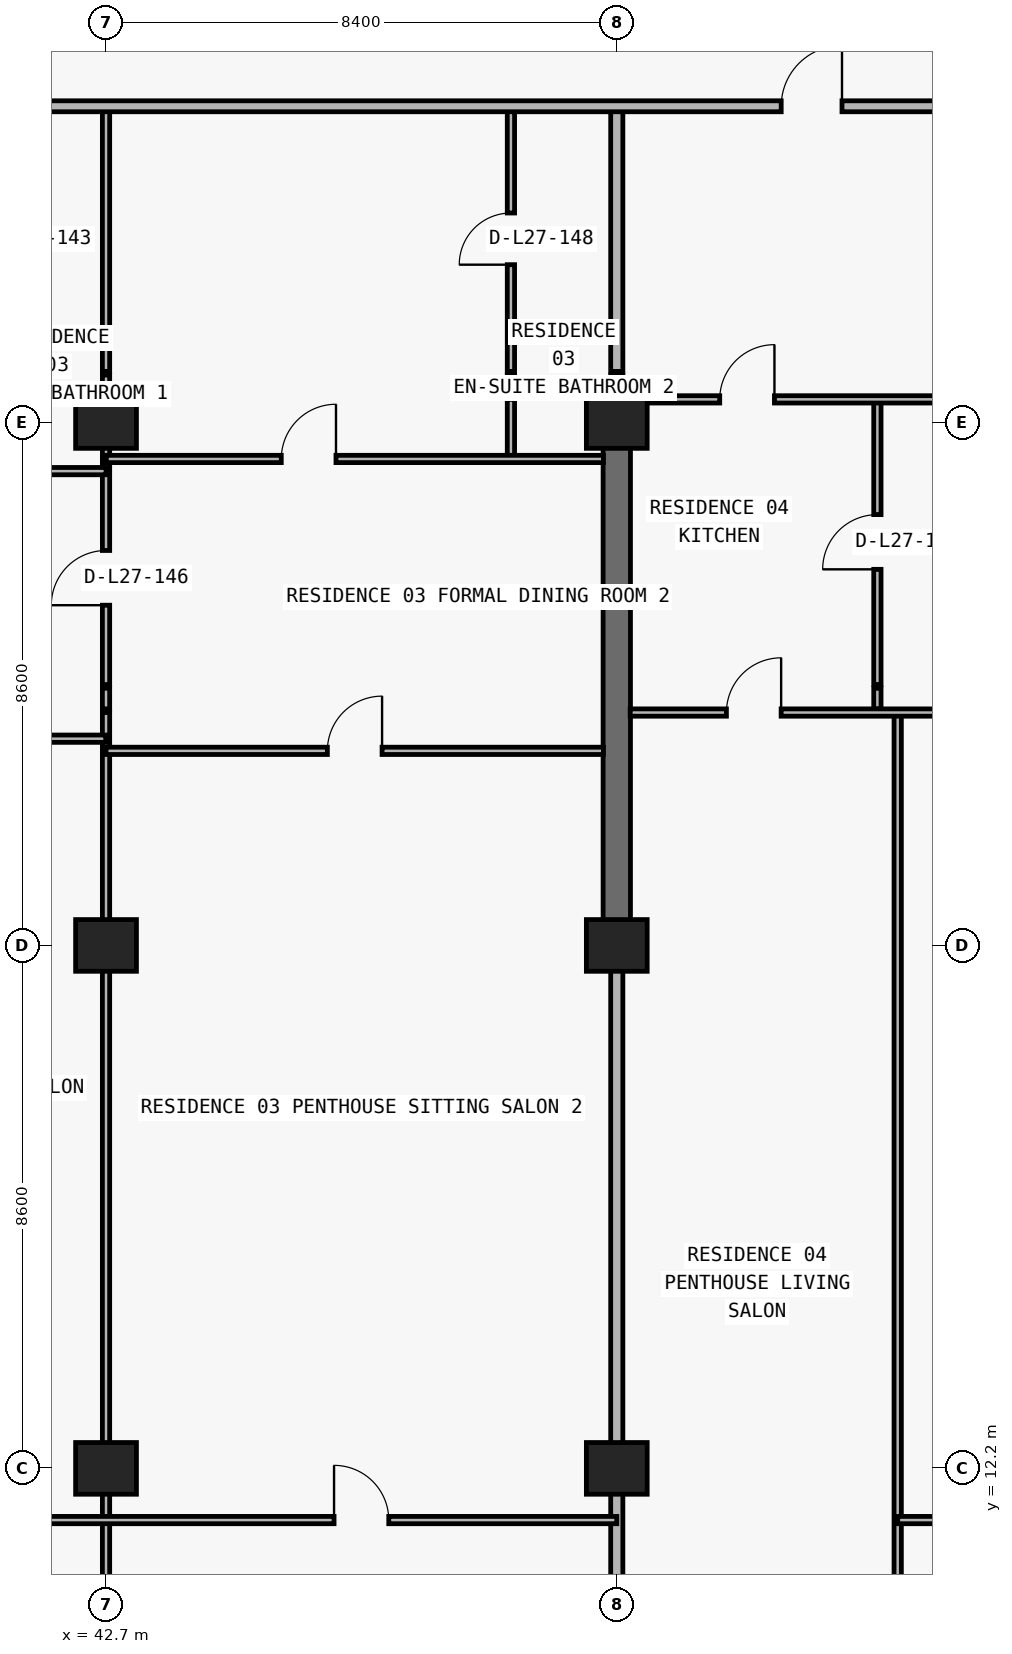
"""IFC4 building model, lengths in metres.
Left out: names, types, materials, properties, quantities, classifications, styles, units other than length and angle.
Written with IfcOpenShell. Run it as: python <this file> out.ifc"""

import sys

from ifc_helpers import new_model, si_unit, direction, frame, frame_2d, origin, origin_2d, place, context, subcontext, project, spatial, rectangle, extrude, element, fill, save


model = new_model("IFC4")
c1 = context("Model", 3, precision=1e-05, world=origin(), true_north=direction((0.0, 1.0)))
c2 = subcontext(c1, "Body", "Model", "MODEL_VIEW")
j1 = project(units=[si_unit("LENGTHUNIT", "METRE"), si_unit("PLANEANGLEUNIT", "RADIAN")], contexts=[c1])
p1 = place(None, origin())
s1 = spatial("IfcSite", under=j1, at=p1, CompositionType="ELEMENT")
p2 = place(p1, origin())
s2 = spatial("IfcBuilding", under=s1, at=p2, CompositionType="ELEMENT")
p3 = place(p2, frame((0.0, 0.0, 102.6)))
s3 = spatial("IfcBuildingStorey", under=s2, at=p3, CompositionType="ELEMENT", Elevation=102.6)
for number, where, z_axis, x_axis in (
    (1, (42.7, 12.2, 0.0), (0.0, 0.0, 1.0), (1.0, 0.0, 0.0)),
    (2, (51.1, 12.2, 0.0), (0.0, 0.0, 1.0), (1.0, 0.0, 0.0)),
    (3, (42.7, 20.8, 0.0), (0.0, 0.0, 1.0), (1.0, 0.0, 0.0)),
    (4, (51.1, 20.8, 0.0), (0.0, 0.0, 1.0), (1.0, 0.0, 0.0)),
    (5, (42.7, 29.4, 0.0), (0.0, 0.0, 1.0), (1.0, 0.0, 0.0)),
    (6, (51.1, 29.4, 0.0), (0.0, 0.0, 1.0), (1.0, 0.0, 0.0)),
):
    element("IfcColumn", number, at=place(p3, frame(where, z_axis=z_axis, x_axis=x_axis)), inside=s3, PredefinedType="COLUMN", context=c2, shape_type="SweptSolid", body=[
        extrude(rectangle(XDim=1.0, YDim=0.85, at=origin_2d()), origin(), (0.0, 0.0, 1.0), 3.05),
    ])
p4 = place(p3, frame((51.1, 20.8, 0.0), z_axis=(0.0, 0.0, 1.0), x_axis=(0.0, 1.0, 0.0)))
e7 = element("IfcWall", 7, at=p4, inside=s3, PredefinedType="SHEAR", context=c2, shape_type="SweptSolid", body=[
    extrude(rectangle(XDim=8.6, YDim=0.45, at=frame_2d((4.3, 0.0))), origin(), (0.0, 0.0, 1.0), 3.05),
])
p5 = place(p3, frame((42.7, 8.84, 0.0), z_axis=(0.0, 0.0, 1.0), x_axis=(0.0, 1.0, 0.0)))
e8 = element("IfcWall", 8, at=p5, inside=s3, PredefinedType="PARTITIONING", context=c2, shape_type="SweptSolid", body=[
    extrude(rectangle(XDim=15.79, YDim=0.12, at=frame_2d((7.895, 0.0))), origin(), (0.0, 0.0, 1.0), 2.174),
])
p6 = place(p3, frame((42.7, 24.69, 0.0), z_axis=(0.0, 0.0, 1.0), x_axis=(0.0, 1.0, 0.0)))
e9 = element("IfcWall", 9, at=p6, inside=s3, PredefinedType="PARTITIONING", context=c2, shape_type="SweptSolid", body=[
    extrude(rectangle(XDim=0.34, YDim=0.12, at=frame_2d((0.17, 0.0))), origin(), (0.0, 0.0, 1.0), 2.174),
])
p7 = place(p3, frame((42.7, 25.09, 0.0), z_axis=(0.0, 0.0, 1.0), x_axis=(0.0, 1.0, 0.0)))
e10 = element("IfcWall", 10, at=p7, inside=s3, PredefinedType="PARTITIONING", context=c2, shape_type="SweptSolid", body=[
    extrude(rectangle(XDim=4.69, YDim=0.12, at=frame_2d((2.345, 0.0))), origin(), (0.0, 0.0, 1.0), 2.174),
])
p8 = place(p7, frame((1.305, 0.0, 0.0)))
e11 = element("IfcOpeningElement", 11, at=p8, cuts=e10, PredefinedType="OPENING", context=c2, shape_type="SweptSolid", body=[
    extrude(rectangle(XDim=0.9, YDim=2.124, at=frame_2d((0.45, 1.062))), frame((0.0, 0.07, 0.0), z_axis=(0.0, -1.0, 0.0), x_axis=(1.0, 0.0, 0.0)), (0.0, 0.0, 1.0), 0.14),
])
p9 = place(p3, frame((42.7, 29.84, 0.0), z_axis=(0.0, 0.0, 1.0), x_axis=(0.0, 1.0, 0.0)))
e12 = element("IfcWall", 12, at=p9, inside=s3, PredefinedType="PARTITIONING", context=c2, shape_type="SweptSolid", body=[
    extrude(rectangle(XDim=0.34, YDim=0.12, at=frame_2d((0.17, 0.0))), origin(), (0.0, 0.0, 1.0), 2.174),
])
p10 = place(p3, frame((42.7, 30.24, 0.0), z_axis=(0.0, 0.0, 1.0), x_axis=(0.0, 1.0, 0.0)))
e13 = element("IfcWall", 13, at=p10, inside=s3, PredefinedType="PARTITIONING", context=c2, shape_type="SweptSolid", body=[
    extrude(rectangle(XDim=4.36, YDim=0.12, at=frame_2d((2.18, 0.0))), origin(), (0.0, 0.0, 1.0), 2.174),
])
p11 = place(p3, frame((49.359, 28.8, 0.0), z_axis=(0.0, 0.0, 1.0), x_axis=(0.0, 1.0, 0.0)))
e14 = element("IfcWall", 14, at=p11, inside=s3, PredefinedType="PARTITIONING", context=c2, shape_type="SweptSolid", body=[
    extrude(rectangle(XDim=0.98, YDim=0.12, at=frame_2d((0.49, 0.0))), origin(), (0.0, 0.0, 1.0), 3.05),
])
p12 = place(p3, frame((49.359, 29.84, 0.0), z_axis=(0.0, 0.0, 1.0), x_axis=(0.0, 1.0, 0.0)))
e15 = element("IfcWall", 15, at=p12, inside=s3, PredefinedType="PARTITIONING", context=c2, shape_type="SweptSolid", body=[
    extrude(rectangle(XDim=0.34, YDim=0.12, at=frame_2d((0.17, 0.0))), origin(), (0.0, 0.0, 1.0), 3.05),
])
p13 = place(p3, frame((49.359, 30.24, 0.0), z_axis=(0.0, 0.0, 1.0), x_axis=(0.0, 1.0, 0.0)))
e16 = element("IfcWall", 16, at=p13, inside=s3, PredefinedType="PARTITIONING", context=c2, shape_type="SweptSolid", body=[
    extrude(rectangle(XDim=4.36, YDim=0.12, at=frame_2d((2.18, 0.0))), origin(), (0.0, 0.0, 1.0), 3.05),
])
p14 = place(p13, frame((1.755, 0.0, 0.0)))
e17 = element("IfcOpeningElement", 17, at=p14, cuts=e16, PredefinedType="OPENING", context=c2, shape_type="SweptSolid", body=[
    extrude(rectangle(XDim=0.85, YDim=2.1, at=frame_2d((0.425, 1.05))), frame((0.0, 0.07, 0.0), z_axis=(0.0, -1.0, 0.0), x_axis=(1.0, 0.0, 0.0)), (0.0, 0.0, 1.0), 0.14),
])
p15 = place(p3, frame((51.1, 8.84, 0.0), z_axis=(0.0, 0.0, 1.0), x_axis=(0.0, 1.0, 0.0)))
e18 = element("IfcWall", 18, at=p15, inside=s3, PredefinedType="PARTITIONING", context=c2, shape_type="SweptSolid", body=[
    extrude(rectangle(XDim=11.955, YDim=0.2, at=frame_2d((5.978, 0.0))), origin(), (0.0, 0.0, 1.0), 2.174),
])
p16 = place(p3, frame((51.1, 29.405, 0.0), z_axis=(0.0, 0.0, 1.0), x_axis=(0.0, 1.0, 0.0)))
e19 = element("IfcWall", 19, at=p16, inside=s3, PredefinedType="PARTITIONING", context=c2, shape_type="SweptSolid", body=[
    extrude(rectangle(XDim=0.375, YDim=0.2, at=frame_2d((0.188, 0.0))), origin(), (0.0, 0.0, 1.0), 3.05),
])
p17 = place(p3, frame((51.1, 29.84, 0.0), z_axis=(0.0, 0.0, 1.0), x_axis=(0.0, 1.0, 0.0)))
e20 = element("IfcWall", 20, at=p17, inside=s3, PredefinedType="PARTITIONING", context=c2, shape_type="SweptSolid", body=[
    extrude(rectangle(XDim=0.34, YDim=0.2, at=frame_2d((0.17, 0.0))), origin(), (0.0, 0.0, 1.0), 2.335),
])
p18 = place(p3, frame((51.1, 30.24, 0.0), z_axis=(0.0, 0.0, 1.0), x_axis=(0.0, 1.0, 0.0)))
e21 = element("IfcWall", 21, at=p18, inside=s3, PredefinedType="PARTITIONING", context=c2, shape_type="SweptSolid", body=[
    extrude(rectangle(XDim=4.36, YDim=0.2, at=frame_2d((2.18, 0.0))), origin(), (0.0, 0.0, 1.0), 2.335),
])
p19 = place(p3, frame((55.386, 24.69, 0.0), z_axis=(0.0, 0.0, 1.0), x_axis=(0.0, 1.0, 0.0)))
e22 = element("IfcWall", 22, at=p19, inside=s3, PredefinedType="PARTITIONING", context=c2, shape_type="SweptSolid", body=[
    extrude(rectangle(XDim=0.34, YDim=0.12, at=frame_2d((0.17, 0.0))), origin(), (0.0, 0.0, 1.0), 3.05),
])
p20 = place(p3, frame((55.386, 25.09, 0.0), z_axis=(0.0, 0.0, 1.0), x_axis=(0.0, 1.0, 0.0)))
e23 = element("IfcWall", 23, at=p20, inside=s3, PredefinedType="PARTITIONING", context=c2, shape_type="SweptSolid", body=[
    extrude(rectangle(XDim=4.69, YDim=0.12, at=frame_2d((2.345, 0.0))), origin(), (0.0, 0.0, 1.0), 2.725),
])
p21 = place(p20, frame((1.895, 0.0, 0.0)))
e24 = element("IfcOpeningElement", 24, at=p21, cuts=e23, PredefinedType="OPENING", context=c2, shape_type="SweptSolid", body=[
    extrude(rectangle(XDim=0.9, YDim=2.15, at=frame_2d((0.45, 1.075))), frame((0.0, 0.07, 0.0), z_axis=(0.0, -1.0, 0.0), x_axis=(1.0, 0.0, 0.0)), (0.0, 0.0, 1.0), 0.14),
])
p22 = place(p3, frame((55.72, 8.84, 0.0), z_axis=(0.0, 0.0, 1.0), x_axis=(0.0, 1.0, 0.0)))
e25 = element("IfcWall", 25, at=p22, inside=s3, PredefinedType="PARTITIONING", context=c2, shape_type="SweptSolid", body=[
    extrude(rectangle(XDim=15.79, YDim=0.12, at=frame_2d((7.895, 0.0))), origin(), (0.0, 0.0, 1.0), 3.05),
])
p23 = place(p3, frame((35.1, 11.35, 0.0), z_axis=(0.0, 0.0, 1.0), x_axis=(1.0, 0.0, 0.0)))
e26 = element("IfcWall", 26, at=p23, inside=s3, PredefinedType="PARTITIONING", context=c2, shape_type="SweptSolid", body=[
    extrude(rectangle(XDim=16.0, YDim=0.12, at=frame_2d((8.0, 0.0))), origin(), (0.0, 0.0, 1.0), 3.05),
])
p24 = place(p23, frame((3.35, 0.0, 0.0)))
e27 = element("IfcOpeningElement", 27, at=p24, cuts=e26, PredefinedType="OPENING", context=c2, shape_type="SweptSolid", body=[
    extrude(rectangle(XDim=0.9, YDim=2.15, at=frame_2d((0.45, 1.075))), frame((0.0, 0.07, 0.0), z_axis=(0.0, -1.0, 0.0), x_axis=(1.0, 0.0, 0.0)), (0.0, 0.0, 1.0), 0.14),
])
p25 = place(p23, frame((11.35, 0.0, 0.0)))
e28 = element("IfcOpeningElement", 28, at=p25, cuts=e26, PredefinedType="OPENING", context=c2, shape_type="SweptSolid", body=[
    extrude(rectangle(XDim=0.9, YDim=2.15, at=frame_2d((0.45, 1.075))), frame((0.0, 0.07, 0.0), z_axis=(0.0, -1.0, 0.0), x_axis=(1.0, 0.0, 0.0)), (0.0, 0.0, 1.0), 0.14),
])
p26 = place(p3, frame((55.72, 11.35, 0.0), z_axis=(0.0, 0.0, 1.0), x_axis=(1.0, 0.0, 0.0)))
e29 = element("IfcWall", 29, at=p26, inside=s3, PredefinedType="PARTITIONING", context=c2, shape_type="SweptSolid", body=[
    extrude(rectangle(XDim=3.78, YDim=0.12, at=frame_2d((1.89, 0.0))), origin(), (0.0, 0.0, 1.0), 3.05),
])
p27 = place(p26, frame((1.44, 0.0, 0.0)))
e30 = element("IfcOpeningElement", 30, at=p27, cuts=e29, PredefinedType="OPENING", context=c2, shape_type="SweptSolid", body=[
    extrude(rectangle(XDim=0.9, YDim=2.15, at=frame_2d((0.45, 1.075))), frame((0.0, 0.07, 0.0), z_axis=(0.0, -1.0, 0.0), x_axis=(1.0, 0.0, 0.0)), (0.0, 0.0, 1.0), 0.14),
])
p28 = place(p3, frame((42.7, 24.0, 0.0), z_axis=(0.0, 0.0, 1.0), x_axis=(1.0, 0.0, 0.0)))
e31 = element("IfcWall", 31, at=p28, inside=s3, PredefinedType="PARTITIONING", context=c2, shape_type="SweptSolid", body=[
    extrude(rectangle(XDim=8.18, YDim=0.12, at=frame_2d((4.09, 0.0))), origin(), (0.0, 0.0, 1.0), 3.05),
])
p29 = place(p28, frame((3.64, 0.0, 0.0)))
e32 = element("IfcOpeningElement", 32, at=p29, cuts=e31, PredefinedType="OPENING", context=c2, shape_type="SweptSolid", body=[
    extrude(rectangle(XDim=0.9, YDim=2.15, at=frame_2d((0.45, 1.075))), frame((0.0, 0.07, 0.0), z_axis=(0.0, -1.0, 0.0), x_axis=(1.0, 0.0, 0.0)), (0.0, 0.0, 1.0), 0.14),
])
p30 = place(p3, frame((35.105, 24.2, 0.0), z_axis=(0.0, 0.0, 1.0), x_axis=(1.0, 0.0, 0.0)))
e33 = element("IfcWall", 33, at=p30, inside=s3, PredefinedType="PARTITIONING", context=c2, shape_type="SweptSolid", body=[
    extrude(rectangle(XDim=7.59, YDim=0.12, at=frame_2d((3.795, 0.0))), origin(), (0.0, 0.0, 1.0), 3.05),
])
p31 = place(p30, frame((3.345, 0.0, 0.0)))
e34 = element("IfcOpeningElement", 34, at=p31, cuts=e33, PredefinedType="OPENING", context=c2, shape_type="SweptSolid", body=[
    extrude(rectangle(XDim=0.9, YDim=2.15, at=frame_2d((0.45, 1.075))), frame((0.0, 0.07, 0.0), z_axis=(0.0, -1.0, 0.0), x_axis=(1.0, 0.0, 0.0)), (0.0, 0.0, 1.0), 0.14),
])
p32 = place(p3, frame((51.32, 24.63, 0.0), z_axis=(0.0, 0.0, 1.0), x_axis=(1.0, 0.0, 0.0)))
e35 = element("IfcWall", 35, at=p32, inside=s3, PredefinedType="PARTITIONING", context=c2, shape_type="SweptSolid", body=[
    extrude(rectangle(XDim=8.18, YDim=0.12, at=frame_2d((4.09, 0.0))), origin(), (0.0, 0.0, 1.0), 3.05),
])
p33 = place(p32, frame((1.583, 0.0, 0.0)))
e36 = element("IfcOpeningElement", 36, at=p33, cuts=e35, PredefinedType="OPENING", context=c2, shape_type="SweptSolid", body=[
    extrude(rectangle(XDim=0.9, YDim=2.15, at=frame_2d((0.45, 1.075))), frame((0.0, 0.07, 0.0), z_axis=(0.0, -1.0, 0.0), x_axis=(1.0, 0.0, 0.0)), (0.0, 0.0, 1.0), 0.14),
])
p34 = place(p32, frame((5.84, 0.0, 0.0)))
e37 = element("IfcOpeningElement", 37, at=p34, cuts=e35, PredefinedType="OPENING", context=c2, shape_type="SweptSolid", body=[
    extrude(rectangle(XDim=0.9, YDim=2.15, at=frame_2d((0.45, 1.075))), frame((0.0, 0.07, 0.0), z_axis=(0.0, -1.0, 0.0), x_axis=(1.0, 0.0, 0.0)), (0.0, 0.0, 1.0), 0.14),
])
p35 = place(p3, frame((35.1, 28.6, 0.0), z_axis=(0.0, 0.0, 1.0), x_axis=(1.0, 0.0, 0.0)))
e38 = element("IfcWall", 38, at=p35, inside=s3, PredefinedType="PARTITIONING", context=c2, shape_type="SweptSolid", body=[
    extrude(rectangle(XDim=7.6, YDim=0.12, at=frame_2d((3.8, 0.0))), origin(), (0.0, 0.0, 1.0), 3.05),
])
p36 = place(p35, frame((2.55, 0.0, 0.0)))
e39 = element("IfcOpeningElement", 39, at=p36, cuts=e38, PredefinedType="OPENING", context=c2, shape_type="SweptSolid", body=[
    extrude(rectangle(XDim=0.9, YDim=2.15, at=frame_2d((0.45, 1.075))), frame((0.0, 0.07, 0.0), z_axis=(0.0, -1.0, 0.0), x_axis=(1.0, 0.0, 0.0)), (0.0, 0.0, 1.0), 0.14),
])
p37 = place(p3, frame((42.705, 28.8, 0.0), z_axis=(0.0, 0.0, 1.0), x_axis=(1.0, 0.0, 0.0)))
e40 = element("IfcWall", 40, at=p37, inside=s3, PredefinedType="PARTITIONING", context=c2, shape_type="SweptSolid", body=[
    extrude(rectangle(XDim=8.175, YDim=0.12, at=frame_2d((4.087, 0.0))), origin(), (0.0, 0.0, 1.0), 3.05),
])
p38 = place(p37, frame((2.877, 0.0, 0.0)))
e41 = element("IfcOpeningElement", 41, at=p38, cuts=e40, PredefinedType="OPENING", context=c2, shape_type="SweptSolid", body=[
    extrude(rectangle(XDim=0.9, YDim=2.15, at=frame_2d((0.45, 1.075))), frame((0.0, 0.07, 0.0), z_axis=(0.0, -1.0, 0.0), x_axis=(1.0, 0.0, 0.0)), (0.0, 0.0, 1.0), 0.14),
])
p39 = place(p3, frame((51.1, 29.78, 0.0), z_axis=(0.0, 0.0, 1.0), x_axis=(1.0, 0.0, 0.0)))
e42 = element("IfcWall", 42, at=p39, inside=s3, PredefinedType="PARTITIONING", context=c2, shape_type="SweptSolid", body=[
    extrude(rectangle(XDim=8.4, YDim=0.12, at=frame_2d((4.2, 0.0))), origin(), (0.0, 0.0, 1.0), 3.05),
])
p40 = place(p39, frame((1.693, 0.0, 0.0)))
e43 = element("IfcOpeningElement", 43, at=p40, cuts=e42, PredefinedType="OPENING", context=c2, shape_type="SweptSolid", body=[
    extrude(rectangle(XDim=0.9, YDim=2.15, at=frame_2d((0.45, 1.075))), frame((0.0, 0.07, 0.0), z_axis=(0.0, -1.0, 0.0), x_axis=(1.0, 0.0, 0.0)), (0.0, 0.0, 1.0), 0.14),
])
p41 = place(p3, frame((18.3, 34.6, 0.0), z_axis=(0.0, 0.0, 1.0), x_axis=(1.0, 0.0, 0.0)))
e44 = element("IfcWall", 44, at=p41, inside=s3, PredefinedType="PARTITIONING", context=c2, shape_type="SweptSolid", body=[
    extrude(rectangle(XDim=41.2, YDim=0.18, at=frame_2d((20.6, 0.0))), origin(), (0.0, 0.0, 1.0), 3.05),
])
p42 = place(p41, frame((2.691, 0.0, 0.0)))
e45 = element("IfcOpeningElement", 45, at=p42, cuts=e44, PredefinedType="OPENING", context=c2, shape_type="SweptSolid", body=[
    extrude(rectangle(XDim=1.0, YDim=2.2, at=frame_2d((0.5, 1.1))), frame((0.0, 0.1, 0.0), z_axis=(0.0, -1.0, 0.0), x_axis=(1.0, 0.0, 0.0)), (0.0, 0.0, 1.0), 0.2),
])
p43 = place(p41, frame((11.212, 0.0, 0.0)))
e46 = element("IfcOpeningElement", 46, at=p43, cuts=e44, PredefinedType="OPENING", context=c2, shape_type="SweptSolid", body=[
    extrude(rectangle(XDim=1.0, YDim=2.2, at=frame_2d((0.5, 1.1))), frame((0.0, 0.1, 0.0), z_axis=(0.0, -1.0, 0.0), x_axis=(1.0, 0.0, 0.0)), (0.0, 0.0, 1.0), 0.2),
])
p44 = place(p41, frame((35.504, 0.0, 0.0)))
e47 = element("IfcOpeningElement", 47, at=p44, cuts=e44, PredefinedType="OPENING", context=c2, shape_type="SweptSolid", body=[
    extrude(rectangle(XDim=1.0, YDim=2.2, at=frame_2d((0.5, 1.1))), frame((0.0, 0.1, 0.0), z_axis=(0.0, -1.0, 0.0), x_axis=(1.0, 0.0, 0.0)), (0.0, 0.0, 1.0), 0.2),
])
p45 = place(p8, origin())
e48 = element("IfcDoor", 48, at=p45, inside=s3, OperationType="SINGLE_SWING_LEFT", PredefinedType="DOOR", context=c2, shape_type="SweptSolid", body=[
    extrude(rectangle(XDim=0.9, YDim=2.124, at=frame_2d((0.45, 1.062))), frame((0.0, 0.025, 0.0), z_axis=(0.0, -1.0, 0.0), x_axis=(1.0, 0.0, 0.0)), (0.0, 0.0, 1.0), 0.05),
])
fill(e11, e48)
p46 = place(p38, origin())
e49 = element("IfcDoor", 49, at=p46, inside=s3, OperationType="SINGLE_SWING_RIGHT", PredefinedType="DOOR", context=c2, shape_type="SweptSolid", body=[
    extrude(rectangle(XDim=0.9, YDim=2.15, at=frame_2d((0.45, 1.075))), frame((0.0, 0.025, 0.0), z_axis=(0.0, -1.0, 0.0), x_axis=(1.0, 0.0, 0.0)), (0.0, 0.0, 1.0), 0.05),
])
fill(e41, e49)
p47 = place(p14, origin())
e50 = element("IfcDoor", 50, at=p47, inside=s3, OperationType="SINGLE_SWING_LEFT", PredefinedType="DOOR", context=c2, shape_type="SweptSolid", body=[
    extrude(rectangle(XDim=0.85, YDim=2.1, at=frame_2d((0.425, 1.05))), frame((0.0, 0.025, 0.0), z_axis=(0.0, -1.0, 0.0), x_axis=(1.0, 0.0, 0.0)), (0.0, 0.0, 1.0), 0.05),
])
fill(e17, e50)
p48 = place(p29, origin())
e51 = element("IfcDoor", 51, at=p48, inside=s3, OperationType="SINGLE_SWING_RIGHT", PredefinedType="DOOR", context=c2, shape_type="SweptSolid", body=[
    extrude(rectangle(XDim=0.9, YDim=2.15, at=frame_2d((0.45, 1.075))), frame((0.0, 0.025, 0.0), z_axis=(0.0, -1.0, 0.0), x_axis=(1.0, 0.0, 0.0)), (0.0, 0.0, 1.0), 0.05),
])
fill(e32, e51)
p49 = place(p25, origin())
e52 = element("IfcDoor", 52, at=p49, inside=s3, OperationType="SINGLE_SWING_LEFT", PredefinedType="DOOR", context=c2, shape_type="SweptSolid", body=[
    extrude(rectangle(XDim=0.9, YDim=2.15, at=frame_2d((0.45, 1.075))), frame((0.0, 0.025, 0.0), z_axis=(0.0, -1.0, 0.0), x_axis=(1.0, 0.0, 0.0)), (0.0, 0.0, 1.0), 0.05),
])
fill(e28, e52)
p50 = place(p44, origin())
e53 = element("IfcDoor", 53, at=p50, inside=s3, OperationType="SINGLE_SWING_RIGHT", PredefinedType="DOOR", context=c2, shape_type="SweptSolid", body=[
    extrude(rectangle(XDim=1.0, YDim=2.2, at=frame_2d((0.5, 1.1))), frame((0.0, 0.025, 0.0), z_axis=(0.0, -1.0, 0.0), x_axis=(1.0, 0.0, 0.0)), (0.0, 0.0, 1.0), 0.05),
])
fill(e47, e53)
p51 = place(p40, origin())
e54 = element("IfcDoor", 54, at=p51, inside=s3, OperationType="SINGLE_SWING_RIGHT", PredefinedType="DOOR", context=c2, shape_type="SweptSolid", body=[
    extrude(rectangle(XDim=0.9, YDim=2.15, at=frame_2d((0.45, 1.075))), frame((0.0, 0.025, 0.0), z_axis=(0.0, -1.0, 0.0), x_axis=(1.0, 0.0, 0.0)), (0.0, 0.0, 1.0), 0.05),
])
fill(e43, e54)
p52 = place(p21, origin())
e55 = element("IfcDoor", 55, at=p52, inside=s3, OperationType="SINGLE_SWING_LEFT", PredefinedType="DOOR", context=c2, shape_type="SweptSolid", body=[
    extrude(rectangle(XDim=0.9, YDim=2.15, at=frame_2d((0.45, 1.075))), frame((0.0, 0.025, 0.0), z_axis=(0.0, -1.0, 0.0), x_axis=(1.0, 0.0, 0.0)), (0.0, 0.0, 1.0), 0.05),
])
fill(e24, e55)
p53 = place(p33, origin())
e56 = element("IfcDoor", 56, at=p53, inside=s3, OperationType="SINGLE_SWING_RIGHT", PredefinedType="DOOR", context=c2, shape_type="SweptSolid", body=[
    extrude(rectangle(XDim=0.9, YDim=2.15, at=frame_2d((0.45, 1.075))), frame((0.0, 0.025, 0.0), z_axis=(0.0, -1.0, 0.0), x_axis=(1.0, 0.0, 0.0)), (0.0, 0.0, 1.0), 0.05),
])
fill(e36, e56)
save(model, sys.argv[1])
